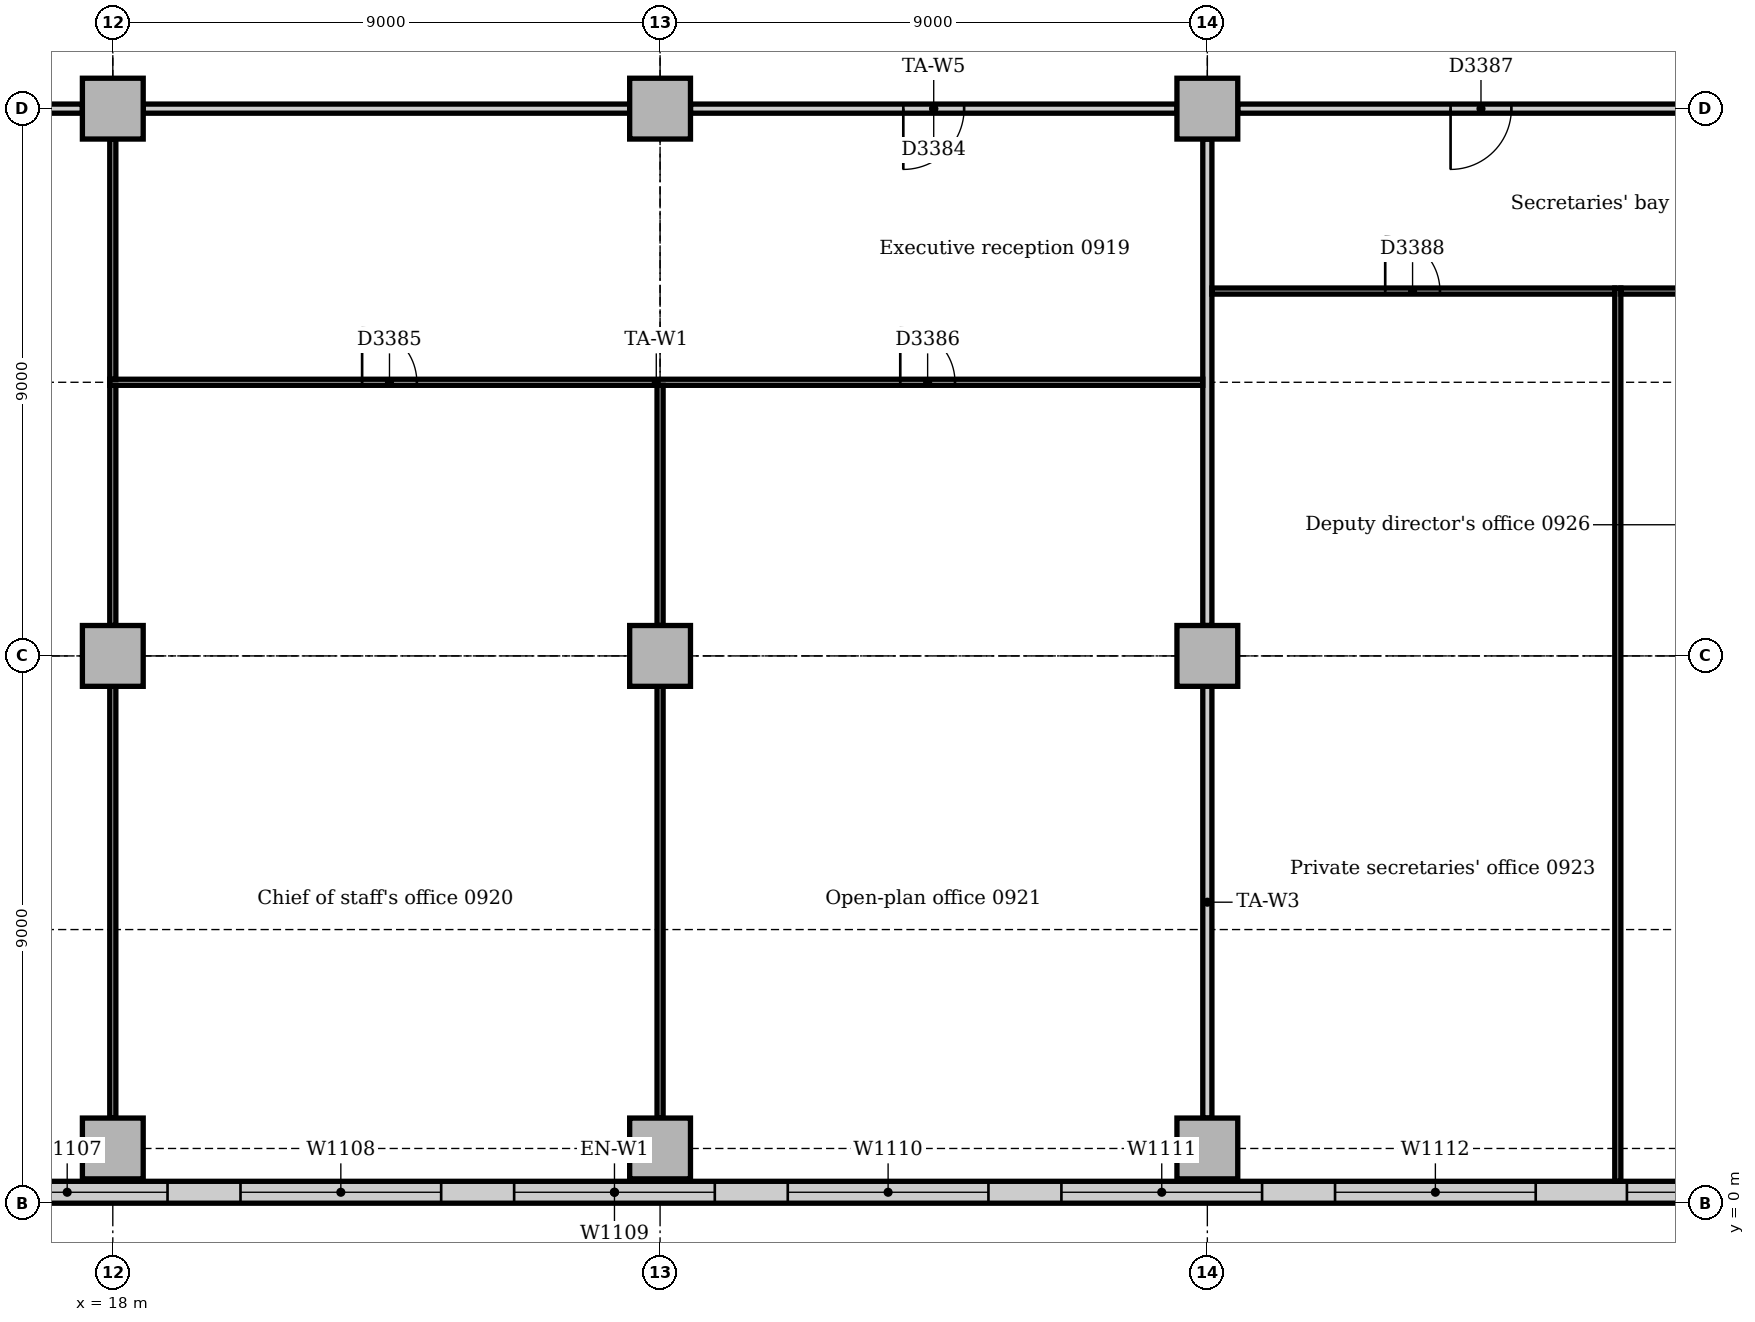
"""IFC4 building model, lengths in metres.
Left out: names, types, materials, properties, quantities, classifications, styles, units other than length and angle.
Written with IfcOpenShell. Run it as: python <this file> out.ifc"""

import sys

from ifc_helpers import new_model, si_unit, direction, frame, frame_2d, origin, origin_2d, place, context, subcontext, project, spatial, rectangle, extrude, element, fill, save


model = new_model("IFC4")
c1 = context("Model", 3, precision=1e-05, world=origin(), true_north=direction((0.0, 1.0)))
c2 = subcontext(c1, "Body", "Model", "MODEL_VIEW")
j1 = project(units=[si_unit("LENGTHUNIT", "METRE"), si_unit("PLANEANGLEUNIT", "RADIAN")], contexts=[c1])
p1 = place(None, origin())
s1 = spatial("IfcSite", under=j1, at=p1, CompositionType="ELEMENT")
p2 = place(p1, origin())
s2 = spatial("IfcBuilding", under=s1, at=p2, CompositionType="ELEMENT")
p3 = place(p2, frame((0.0, 0.0, 42.0)))
s3 = spatial("IfcBuildingStorey", under=s2, at=p3, CompositionType="ELEMENT", Elevation=42.0)
for number, where, z_axis, x_axis in (
    (1, (18.0, 0.9, 0.0), (0.0, 0.0, 1.0), (1.0, 0.0, 0.0)),
    (2, (27.0, 0.9, 0.0), (0.0, 0.0, 1.0), (1.0, 0.0, 0.0)),
    (3, (36.0, 0.9, 0.0), (0.0, 0.0, 1.0), (1.0, 0.0, 0.0)),
    (4, (18.0, 9.0, 0.0), (0.0, 0.0, 1.0), (1.0, 0.0, 0.0)),
    (5, (18.0, 18.0, 0.0), (0.0, 0.0, 1.0), (1.0, 0.0, 0.0)),
    (6, (27.0, 9.0, 0.0), (0.0, 0.0, 1.0), (1.0, 0.0, 0.0)),
    (7, (27.0, 18.0, 0.0), (0.0, 0.0, 1.0), (1.0, 0.0, 0.0)),
    (8, (36.0, 9.0, 0.0), (0.0, 0.0, 1.0), (1.0, 0.0, 0.0)),
    (9, (36.0, 18.0, 0.0), (0.0, 0.0, 1.0), (1.0, 0.0, 0.0)),
):
    element("IfcColumn", number, at=place(p3, frame(where, z_axis=z_axis, x_axis=x_axis)), inside=s3, PredefinedType="COLUMN", context=c2, shape_type="SweptSolid", body=[
        extrude(rectangle(XDim=1.0, YDim=1.0, at=origin_2d()), origin(), (0.0, 0.0, 1.0), 3.7),
    ])
p4 = place(p3, frame((4.243, 0.18, 0.0), z_axis=(0.0, 0.0, 1.0), x_axis=(1.0, 0.0, 0.0)))
e10 = element("IfcWall", 10, at=p4, inside=s3, PredefinedType="STANDARD", context=c2, shape_type="SweptSolid", body=[
    extrude(rectangle(XDim=44.015, YDim=0.36, at=frame_2d((22.007, 0.0))), origin(), (0.0, 0.0, 1.0), 3.7),
])
p5 = place(p4, frame((2.357, 0.0, 0.9)))
e11 = element("IfcOpeningElement", 11, at=p5, cuts=e10, PredefinedType="OPENING", context=c2, shape_type="SweptSolid", body=[
    extrude(rectangle(XDim=3.3, YDim=1.6, at=frame_2d((1.65, 0.8))), frame((0.0, 0.19, 0.0), z_axis=(0.0, -1.0, 0.0), x_axis=(1.0, 0.0, 0.0)), (0.0, 0.0, 1.0), 0.38),
])
p6 = place(p4, frame((6.857, 0.0, 0.9)))
e12 = element("IfcOpeningElement", 12, at=p6, cuts=e10, PredefinedType="OPENING", context=c2, shape_type="SweptSolid", body=[
    extrude(rectangle(XDim=3.3, YDim=1.6, at=frame_2d((1.65, 0.8))), frame((0.0, 0.19, 0.0), z_axis=(0.0, -1.0, 0.0), x_axis=(1.0, 0.0, 0.0)), (0.0, 0.0, 1.0), 0.38),
])
p7 = place(p4, frame((11.357, 0.0, 0.9)))
e13 = element("IfcOpeningElement", 13, at=p7, cuts=e10, PredefinedType="OPENING", context=c2, shape_type="SweptSolid", body=[
    extrude(rectangle(XDim=3.3, YDim=1.6, at=frame_2d((1.65, 0.8))), frame((0.0, 0.19, 0.0), z_axis=(0.0, -1.0, 0.0), x_axis=(1.0, 0.0, 0.0)), (0.0, 0.0, 1.0), 0.38),
])
p8 = place(p4, frame((15.857, 0.0, 0.9)))
e14 = element("IfcOpeningElement", 14, at=p8, cuts=e10, PredefinedType="OPENING", context=c2, shape_type="SweptSolid", body=[
    extrude(rectangle(XDim=3.3, YDim=1.6, at=frame_2d((1.65, 0.8))), frame((0.0, 0.19, 0.0), z_axis=(0.0, -1.0, 0.0), x_axis=(1.0, 0.0, 0.0)), (0.0, 0.0, 1.0), 0.38),
])
p9 = place(p4, frame((20.357, 0.0, 0.9)))
e15 = element("IfcOpeningElement", 15, at=p9, cuts=e10, PredefinedType="OPENING", context=c2, shape_type="SweptSolid", body=[
    extrude(rectangle(XDim=3.3, YDim=1.6, at=frame_2d((1.65, 0.8))), frame((0.0, 0.19, 0.0), z_axis=(0.0, -1.0, 0.0), x_axis=(1.0, 0.0, 0.0)), (0.0, 0.0, 1.0), 0.38),
])
p10 = place(p4, frame((24.857, 0.0, 0.9)))
e16 = element("IfcOpeningElement", 16, at=p10, cuts=e10, PredefinedType="OPENING", context=c2, shape_type="SweptSolid", body=[
    extrude(rectangle(XDim=3.3, YDim=1.6, at=frame_2d((1.65, 0.8))), frame((0.0, 0.19, 0.0), z_axis=(0.0, -1.0, 0.0), x_axis=(1.0, 0.0, 0.0)), (0.0, 0.0, 1.0), 0.38),
])
p11 = place(p4, frame((29.357, 0.0, 0.9)))
e17 = element("IfcOpeningElement", 17, at=p11, cuts=e10, PredefinedType="OPENING", context=c2, shape_type="SweptSolid", body=[
    extrude(rectangle(XDim=3.3, YDim=1.6, at=frame_2d((1.65, 0.8))), frame((0.0, 0.19, 0.0), z_axis=(0.0, -1.0, 0.0), x_axis=(1.0, 0.0, 0.0)), (0.0, 0.0, 1.0), 0.38),
])
p12 = place(p4, frame((33.857, 0.0, 0.9)))
e18 = element("IfcOpeningElement", 18, at=p12, cuts=e10, PredefinedType="OPENING", context=c2, shape_type="SweptSolid", body=[
    extrude(rectangle(XDim=3.3, YDim=1.6, at=frame_2d((1.65, 0.8))), frame((0.0, 0.19, 0.0), z_axis=(0.0, -1.0, 0.0), x_axis=(1.0, 0.0, 0.0)), (0.0, 0.0, 1.0), 0.38),
])
p13 = place(p4, frame((38.657, 0.0, 0.9)))
e19 = element("IfcOpeningElement", 19, at=p13, cuts=e10, PredefinedType="OPENING", context=c2, shape_type="SweptSolid", body=[
    extrude(rectangle(XDim=3.3, YDim=1.6, at=frame_2d((1.65, 0.8))), frame((0.0, 0.19, 0.0), z_axis=(0.0, -1.0, 0.0), x_axis=(1.0, 0.0, 0.0)), (0.0, 0.0, 1.0), 0.38),
])
p14 = place(p3, frame((36.5, 18.0, 0.0), z_axis=(0.0, 0.0, 1.0), x_axis=(1.0, 0.0, 0.0)))
e20 = element("IfcWall", 20, at=p14, inside=s3, PredefinedType="PARTITIONING", context=c2, shape_type="SweptSolid", body=[
    extrude(rectangle(XDim=8.0, YDim=0.15, at=frame_2d((4.0, 0.0))), origin(), (0.0, 0.0, 1.0), 3.0),
])
p15 = place(p14, frame((3.5, 0.0, 0.0)))
e21 = element("IfcOpeningElement", 21, at=p15, cuts=e20, PredefinedType="OPENING", context=c2, shape_type="SweptSolid", body=[
    extrude(rectangle(XDim=1.0, YDim=2.1, at=frame_2d((0.5, 1.05))), frame((0.0, 0.085, 0.0), z_axis=(0.0, -1.0, 0.0), x_axis=(1.0, 0.0, 0.0)), (0.0, 0.0, 1.0), 0.17),
])
p16 = place(p3, frame((27.5, 18.0, 0.0), z_axis=(0.0, 0.0, 1.0), x_axis=(1.0, 0.0, 0.0)))
e22 = element("IfcWall", 22, at=p16, inside=s3, PredefinedType="PARTITIONING", context=c2, shape_type="SweptSolid", body=[
    extrude(rectangle(XDim=8.0, YDim=0.15, at=frame_2d((4.0, 0.0))), origin(), (0.0, 0.0, 1.0), 3.0),
])
p17 = place(p16, frame((3.5, 0.0, 0.0)))
e23 = element("IfcOpeningElement", 23, at=p17, cuts=e22, PredefinedType="OPENING", context=c2, shape_type="SweptSolid", body=[
    extrude(rectangle(XDim=1.0, YDim=2.1, at=frame_2d((0.5, 1.05))), frame((0.0, 0.085, 0.0), z_axis=(0.0, -1.0, 0.0), x_axis=(1.0, 0.0, 0.0)), (0.0, 0.0, 1.0), 0.17),
])
p18 = place(p3, frame((18.5, 18.0, 0.0), z_axis=(0.0, 0.0, 1.0), x_axis=(1.0, 0.0, 0.0)))
e24 = element("IfcWall", 24, at=p18, inside=s3, PredefinedType="PARTITIONING", context=c2, shape_type="SweptSolid", body=[
    extrude(rectangle(XDim=8.0, YDim=0.15, at=frame_2d((4.0, 0.0))), origin(), (0.0, 0.0, 1.0), 3.0),
])
p19 = place(p3, frame((9.5, 18.0, 0.0), z_axis=(0.0, 0.0, 1.0), x_axis=(1.0, 0.0, 0.0)))
e25 = element("IfcWall", 25, at=p19, inside=s3, PredefinedType="PARTITIONING", context=c2, shape_type="SweptSolid", body=[
    extrude(rectangle(XDim=8.0, YDim=0.15, at=frame_2d((4.0, 0.0))), origin(), (0.0, 0.0, 1.0), 3.0),
])
p20 = place(p19, frame((3.55, 0.0, 0.0)))
e26 = element("IfcOpeningElement", 26, at=p20, cuts=e25, PredefinedType="OPENING", context=c2, shape_type="SweptSolid", body=[
    extrude(rectangle(XDim=0.9, YDim=2.1, at=frame_2d((0.45, 1.05))), frame((0.0, 0.085, 0.0), z_axis=(0.0, -1.0, 0.0), x_axis=(1.0, 0.0, 0.0)), (0.0, 0.0, 1.0), 0.17),
])
p21 = place(p3, frame((36.0, 1.4, 0.0), z_axis=(0.0, 0.0, 1.0), x_axis=(0.0, 1.0, 0.0)))
e27 = element("IfcWall", 27, at=p21, inside=s3, PredefinedType="PARTITIONING", context=c2, shape_type="SweptSolid", body=[
    extrude(rectangle(XDim=7.1, YDim=0.15, at=frame_2d((3.55, 0.0))), origin(), (0.0, 0.0, 1.0), 3.008),
])
p22 = place(p3, frame((36.0, 9.5, 0.0), z_axis=(0.0, 0.0, 1.0), x_axis=(0.0, 1.0, 0.0)))
e28 = element("IfcWall", 28, at=p22, inside=s3, PredefinedType="PARTITIONING", context=c2, shape_type="SweptSolid", body=[
    extrude(rectangle(XDim=8.0, YDim=0.15, at=frame_2d((4.0, 0.0))), origin(), (0.0, 0.0, 1.0), 3.008),
])
p23 = place(p3, frame((17.95, 13.5, 0.0), z_axis=(0.0, 0.0, 1.0), x_axis=(1.0, 0.0, 0.0)))
e29 = element("IfcWall", 29, at=p23, inside=s3, PredefinedType="PARTITIONING", context=c2, shape_type="SweptSolid", body=[
    extrude(rectangle(XDim=17.975, YDim=0.1, at=frame_2d((8.988, 0.0))), origin(), (0.0, 0.0, 1.0), 3.2),
])
p24 = place(p23, frame((4.15, 0.0, 0.0)))
e30 = element("IfcOpeningElement", 30, at=p24, cuts=e29, PredefinedType="OPENING", context=c2, shape_type="SweptSolid", body=[
    extrude(rectangle(XDim=0.9, YDim=2.1, at=frame_2d((0.45, 1.05))), frame((0.0, 0.06, 0.0), z_axis=(0.0, -1.0, 0.0), x_axis=(1.0, 0.0, 0.0)), (0.0, 0.0, 1.0), 0.12),
])
p25 = place(p23, frame((13.0, 0.0, 0.0)))
e31 = element("IfcOpeningElement", 31, at=p25, cuts=e29, PredefinedType="OPENING", context=c2, shape_type="SweptSolid", body=[
    extrude(rectangle(XDim=0.9, YDim=2.1, at=frame_2d((0.45, 1.05))), frame((0.0, 0.06, 0.0), z_axis=(0.0, -1.0, 0.0), x_axis=(1.0, 0.0, 0.0)), (0.0, 0.0, 1.0), 0.12),
])
p26 = place(p3, frame((18.0, 1.4, 0.0), z_axis=(0.0, 0.0, 1.0), x_axis=(0.0, 1.0, 0.0)))
e32 = element("IfcWall", 32, at=p26, inside=s3, PredefinedType="PARTITIONING", context=c2, shape_type="SweptSolid", body=[
    extrude(rectangle(XDim=7.1, YDim=0.1, at=frame_2d((3.55, 0.0))), origin(), (0.0, 0.0, 1.0), 3.008),
])
for number, where, z_axis, x_axis in (
    (33, (18.0, 13.55, 0.0), (0.0, 0.0, 1.0), (0.0, 1.0, 0.0)),
    (34, (18.0, 9.5, 0.0), (0.0, 0.0, 1.0), (0.0, 1.0, 0.0)),
):
    element("IfcWall", number, at=place(p3, frame(where, z_axis=z_axis, x_axis=x_axis)), inside=s3, PredefinedType="PARTITIONING", context=c2, shape_type="SweptSolid", body=[
        extrude(rectangle(XDim=3.95, YDim=0.1, at=frame_2d((1.975, 0.0))), origin(), (0.0, 0.0, 1.0), 3.008),
    ])
p27 = place(p3, frame((42.75, 0.36, 0.0), z_axis=(0.0, 0.0, 1.0), x_axis=(0.0, 1.0, 0.0)))
e35 = element("IfcWall", 35, at=p27, inside=s3, PredefinedType="PARTITIONING", context=c2, shape_type="SweptSolid", body=[
    extrude(rectangle(XDim=14.69, YDim=0.1, at=frame_2d((7.345, 0.0))), origin(), (0.0, 0.0, 1.0), 3.7),
])
p28 = place(p3, frame((36.075, 15.0, 0.0), z_axis=(0.0, 0.0, 1.0), x_axis=(1.0, 0.0, 0.0)))
e36 = element("IfcWall", 36, at=p28, inside=s3, PredefinedType="PARTITIONING", context=c2, shape_type="SweptSolid", body=[
    extrude(rectangle(XDim=6.625, YDim=0.1, at=frame_2d((3.312, 0.0))), origin(), (0.0, 0.0, 1.0), 3.7),
])
p29 = place(p28, frame((2.85, 0.0, 0.0)))
e37 = element("IfcOpeningElement", 37, at=p29, cuts=e36, PredefinedType="OPENING", context=c2, shape_type="SweptSolid", body=[
    extrude(rectangle(XDim=0.9, YDim=2.1, at=frame_2d((0.45, 1.05))), frame((0.0, 0.06, 0.0), z_axis=(0.0, -1.0, 0.0), x_axis=(1.0, 0.0, 0.0)), (0.0, 0.0, 1.0), 0.12),
])
p30 = place(p3, frame((42.8, 15.0, 0.0), z_axis=(0.0, 0.0, 1.0), x_axis=(1.0, 0.0, 0.0)))
e38 = element("IfcWall", 38, at=p30, inside=s3, PredefinedType="PARTITIONING", context=c2, shape_type="SweptSolid", body=[
    extrude(rectangle(XDim=6.625, YDim=0.1, at=frame_2d((3.312, 0.0))), origin(), (0.0, 0.0, 1.0), 3.7),
])
p31 = place(p30, frame((2.85, 0.0, 0.0)))
e39 = element("IfcOpeningElement", 39, at=p31, cuts=e38, PredefinedType="OPENING", context=c2, shape_type="SweptSolid", body=[
    extrude(rectangle(XDim=0.9, YDim=2.1, at=frame_2d((0.45, 1.05))), frame((0.0, 0.06, 0.0), z_axis=(0.0, -1.0, 0.0), x_axis=(1.0, 0.0, 0.0)), (0.0, 0.0, 1.0), 0.12),
])
p32 = place(p3, frame((27.0, 1.4, 0.0), z_axis=(0.0, 0.0, 1.0), x_axis=(0.0, 1.0, 0.0)))
e40 = element("IfcWall", 40, at=p32, inside=s3, PredefinedType="PARTITIONING", context=c2, shape_type="SweptSolid", body=[
    extrude(rectangle(XDim=7.1, YDim=0.1, at=frame_2d((3.55, 0.0))), origin(), (0.0, 0.0, 1.0), 3.008),
])
p33 = place(p3, frame((27.0, 9.5, 0.0), z_axis=(0.0, 0.0, 1.0), x_axis=(0.0, 1.0, 0.0)))
e41 = element("IfcWall", 41, at=p33, inside=s3, PredefinedType="PARTITIONING", context=c2, shape_type="SweptSolid", body=[
    extrude(rectangle(XDim=3.95, YDim=0.1, at=frame_2d((1.975, 0.0))), origin(), (0.0, 0.0, 1.0), 3.008),
])
p34 = place(p7, origin())
e42 = element("IfcWindow", 42, at=p34, inside=s3, PartitioningType="SINGLE_PANEL", PredefinedType="WINDOW", context=c2, shape_type="SweptSolid", body=[
    extrude(rectangle(XDim=3.3, YDim=1.6, at=frame_2d((1.65, 0.8))), frame((0.0, 0.13, 0.0), z_axis=(0.0, -1.0, 0.0), x_axis=(1.0, 0.0, 0.0)), (0.0, 0.0, 1.0), 0.06),
])
fill(e13, e42)
p35 = place(p8, origin())
e43 = element("IfcWindow", 43, at=p35, inside=s3, PartitioningType="SINGLE_PANEL", PredefinedType="WINDOW", context=c2, shape_type="SweptSolid", body=[
    extrude(rectangle(XDim=3.3, YDim=1.6, at=frame_2d((1.65, 0.8))), frame((0.0, 0.13, 0.0), z_axis=(0.0, -1.0, 0.0), x_axis=(1.0, 0.0, 0.0)), (0.0, 0.0, 1.0), 0.06),
])
fill(e14, e43)
p36 = place(p9, origin())
e44 = element("IfcWindow", 44, at=p36, inside=s3, PartitioningType="SINGLE_PANEL", PredefinedType="WINDOW", context=c2, shape_type="SweptSolid", body=[
    extrude(rectangle(XDim=3.3, YDim=1.6, at=frame_2d((1.65, 0.8))), frame((0.0, 0.13, 0.0), z_axis=(0.0, -1.0, 0.0), x_axis=(1.0, 0.0, 0.0)), (0.0, 0.0, 1.0), 0.06),
])
fill(e15, e44)
p37 = place(p10, origin())
e45 = element("IfcWindow", 45, at=p37, inside=s3, PartitioningType="SINGLE_PANEL", PredefinedType="WINDOW", context=c2, shape_type="SweptSolid", body=[
    extrude(rectangle(XDim=3.3, YDim=1.6, at=frame_2d((1.65, 0.8))), frame((0.0, 0.13, 0.0), z_axis=(0.0, -1.0, 0.0), x_axis=(1.0, 0.0, 0.0)), (0.0, 0.0, 1.0), 0.06),
])
fill(e16, e45)
p38 = place(p11, origin())
e46 = element("IfcWindow", 46, at=p38, inside=s3, PartitioningType="SINGLE_PANEL", PredefinedType="WINDOW", context=c2, shape_type="SweptSolid", body=[
    extrude(rectangle(XDim=3.3, YDim=1.6, at=frame_2d((1.65, 0.8))), frame((0.0, 0.13, 0.0), z_axis=(0.0, -1.0, 0.0), x_axis=(1.0, 0.0, 0.0)), (0.0, 0.0, 1.0), 0.06),
])
fill(e17, e46)
p39 = place(p12, origin())
e47 = element("IfcWindow", 47, at=p39, inside=s3, PartitioningType="SINGLE_PANEL", PredefinedType="WINDOW", context=c2, shape_type="SweptSolid", body=[
    extrude(rectangle(XDim=3.3, YDim=1.6, at=frame_2d((1.65, 0.8))), frame((0.0, 0.13, 0.0), z_axis=(0.0, -1.0, 0.0), x_axis=(1.0, 0.0, 0.0)), (0.0, 0.0, 1.0), 0.06),
])
fill(e18, e47)
p40 = place(p13, origin())
e48 = element("IfcWindow", 48, at=p40, inside=s3, PartitioningType="SINGLE_PANEL", PredefinedType="WINDOW", context=c2, shape_type="SweptSolid", body=[
    extrude(rectangle(XDim=3.3, YDim=1.6, at=frame_2d((1.65, 0.8))), frame((0.0, 0.13, 0.0), z_axis=(0.0, -1.0, 0.0), x_axis=(1.0, 0.0, 0.0)), (0.0, 0.0, 1.0), 0.06),
])
fill(e19, e48)
p41 = place(p17, frame((1.0, 0.0, 0.0), z_axis=(0.0, 0.0, 1.0), x_axis=(-1.0, 0.0, 0.0)))
e49 = element("IfcDoor", 49, at=p41, inside=s3, OperationType="SINGLE_SWING_RIGHT", PredefinedType="DOOR", context=c2, shape_type="SweptSolid", body=[
    extrude(rectangle(XDim=1.0, YDim=2.1, at=frame_2d((0.5, 1.05))), frame((0.0, 0.025, 0.0), z_axis=(0.0, -1.0, 0.0), x_axis=(1.0, 0.0, 0.0)), (0.0, 0.0, 1.0), 0.05),
])
fill(e23, e49)
p42 = place(p24, origin())
e50 = element("IfcDoor", 50, at=p42, inside=s3, OperationType="SINGLE_SWING_LEFT", PredefinedType="DOOR", context=c2, shape_type="SweptSolid", body=[
    extrude(rectangle(XDim=0.9, YDim=2.1, at=frame_2d((0.45, 1.05))), frame((0.0, 0.025, 0.0), z_axis=(0.0, -1.0, 0.0), x_axis=(1.0, 0.0, 0.0)), (0.0, 0.0, 1.0), 0.05),
])
fill(e30, e50)
p43 = place(p25, origin())
e51 = element("IfcDoor", 51, at=p43, inside=s3, OperationType="SINGLE_SWING_LEFT", PredefinedType="DOOR", context=c2, shape_type="SweptSolid", body=[
    extrude(rectangle(XDim=0.9, YDim=2.1, at=frame_2d((0.45, 1.05))), frame((0.0, 0.025, 0.0), z_axis=(0.0, -1.0, 0.0), x_axis=(1.0, 0.0, 0.0)), (0.0, 0.0, 1.0), 0.05),
])
fill(e31, e51)
p44 = place(p15, frame((1.0, 0.0, 0.0), z_axis=(0.0, 0.0, 1.0), x_axis=(-1.0, 0.0, 0.0)))
e52 = element("IfcDoor", 52, at=p44, inside=s3, OperationType="SINGLE_SWING_RIGHT", PredefinedType="DOOR", context=c2, shape_type="SweptSolid", body=[
    extrude(rectangle(XDim=1.0, YDim=2.1, at=frame_2d((0.5, 1.05))), frame((0.0, 0.025, 0.0), z_axis=(0.0, -1.0, 0.0), x_axis=(1.0, 0.0, 0.0)), (0.0, 0.0, 1.0), 0.05),
])
fill(e21, e52)
p45 = place(p29, origin())
e53 = element("IfcDoor", 53, at=p45, inside=s3, OperationType="SINGLE_SWING_LEFT", PredefinedType="DOOR", context=c2, shape_type="SweptSolid", body=[
    extrude(rectangle(XDim=0.9, YDim=2.1, at=frame_2d((0.45, 1.05))), frame((0.0, 0.025, 0.0), z_axis=(0.0, -1.0, 0.0), x_axis=(1.0, 0.0, 0.0)), (0.0, 0.0, 1.0), 0.05),
])
fill(e37, e53)
save(model, sys.argv[1])
